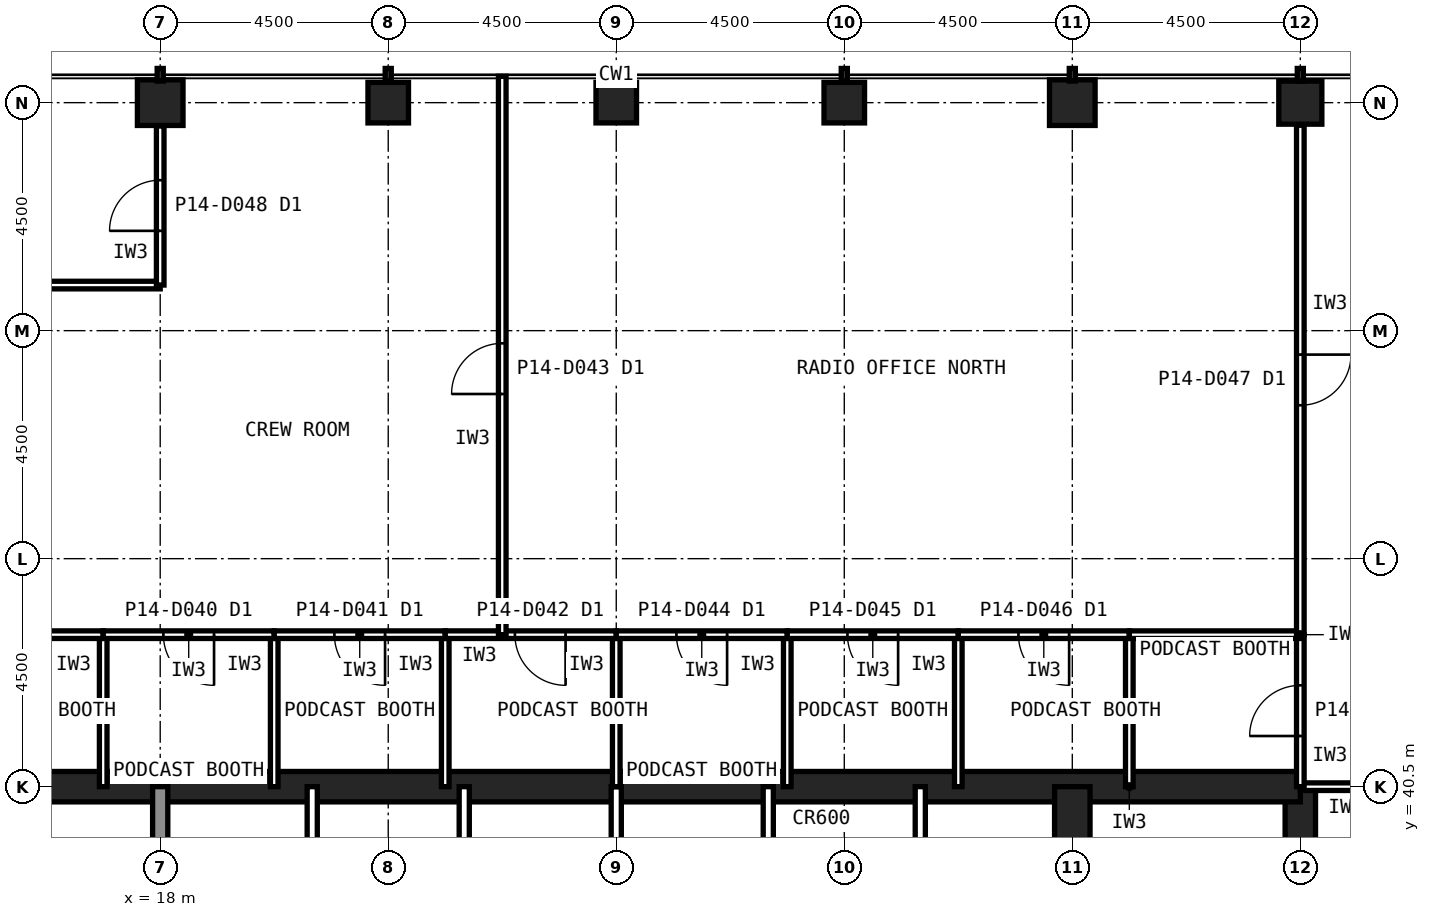
"""IFC4 building model, lengths in metres.
Left out: names, types, materials, properties, quantities, classifications, styles, units other than length and angle.
Written with IfcOpenShell. Run it as: python <this file> out.ifc"""

import sys

from ifc_helpers import new_model, si_unit, direction, frame, frame_2d, origin, origin_2d, place, context, subcontext, project, spatial, rectangle, hollow_rectangle, extrude, element, fill, save


model = new_model("IFC4")
c1 = context("Model", 3, precision=1e-05, world=origin(), true_north=direction((0.0, 1.0)))
c2 = subcontext(c1, "Body", "Model", "MODEL_VIEW")
j1 = project(units=[si_unit("LENGTHUNIT", "METRE"), si_unit("PLANEANGLEUNIT", "RADIAN")], contexts=[c1])
p1 = place(None, origin())
s1 = spatial("IfcSite", under=j1, at=p1, CompositionType="ELEMENT")
p2 = place(p1, origin())
s2 = spatial("IfcBuilding", under=s1, at=p2, CompositionType="ELEMENT")
p3 = place(p2, frame((0.0, 0.0, 62.6)))
s3 = spatial("IfcBuildingStorey", under=s2, at=p3, CompositionType="ELEMENT", Elevation=62.6)
p4 = place(p3, frame((40.5, 54.0, 0.0), z_axis=(0.0, 0.0, 1.0), x_axis=(1.0, 0.0, 0.0)))
e1 = element("IfcColumn", 1, at=p4, inside=s3, PredefinedType="COLUMN", context=c2, shape_type="SweptSolid", body=[
    extrude(hollow_rectangle(XDim=0.85, YDim=0.85, WallThickness=0.05, at=origin_2d()), origin(), (0.0, 0.0, 1.0), 4.2),
])
p5 = place(p3, frame((36.0, 54.0, 0.0), z_axis=(0.0, 0.0, 1.0), x_axis=(1.0, 0.0, 0.0)))
e2 = element("IfcColumn", 2, at=p5, inside=s3, PredefinedType="COLUMN", context=c2, shape_type="SweptSolid", body=[
    extrude(hollow_rectangle(XDim=0.9, YDim=0.9, WallThickness=0.063, at=origin_2d()), origin(), (0.0, 0.0, 1.0), 4.2),
])
for number, where, z_axis, x_axis in (
    (3, (31.5, 54.0, 0.0), (0.0, 0.0, 1.0), (1.0, 0.0, 0.0)),
    (4, (27.0, 54.0, 0.0), (0.0, 0.0, 1.0), (1.0, 0.0, 0.0)),
    (5, (22.5, 54.0, 0.0), (0.0, 0.0, 1.0), (1.0, 0.0, 0.0)),
):
    element("IfcColumn", number, at=place(p3, frame(where, z_axis=z_axis, x_axis=x_axis)), inside=s3, PredefinedType="COLUMN", context=c2, shape_type="SweptSolid", body=[
        extrude(hollow_rectangle(XDim=0.8, YDim=0.8, WallThickness=0.045, at=origin_2d()), origin(), (0.0, 0.0, 1.0), 4.2),
    ])
p6 = place(p3, frame((18.0, 54.0, 0.0), z_axis=(0.0, 0.0, 1.0), x_axis=(1.0, 0.0, 0.0)))
e6 = element("IfcColumn", 6, at=p6, inside=s3, PredefinedType="COLUMN", context=c2, shape_type="SweptSolid", body=[
    extrude(hollow_rectangle(XDim=0.9, YDim=0.9, WallThickness=0.063, at=origin_2d()), origin(), (0.0, 0.0, 1.0), 4.2),
])
p7 = place(p3, frame((40.5, 13.5, 0.0), z_axis=(0.0, 0.0, 1.0), x_axis=(0.0, 1.0, 0.0)))
e7 = element("IfcWall", 7, at=p7, inside=s3, PredefinedType="SHEAR", context=c2, shape_type="SweptSolid", body=[
    extrude(rectangle(XDim=27.0, YDim=0.6, at=frame_2d((13.5, 0.0))), origin(), (0.0, 0.0, 1.0), 4.2),
])
p8 = place(p7, frame((5.85, 0.0, 0.0)))
e8 = element("IfcOpeningElement", 8, at=p8, cuts=e7, PredefinedType="OPENING", context=c2, shape_type="SweptSolid", body=[
    extrude(rectangle(XDim=1.8, YDim=2.1, at=frame_2d((0.9, 1.05))), frame((0.0, 0.31, 0.0), z_axis=(0.0, -1.0, 0.0), x_axis=(1.0, 0.0, 0.0)), (0.0, 0.0, 1.0), 0.62),
])
p9 = place(p7, frame((19.65, 0.0, 0.0)))
e9 = element("IfcOpeningElement", 9, at=p9, cuts=e7, PredefinedType="OPENING", context=c2, shape_type="SweptSolid", body=[
    extrude(rectangle(XDim=1.2, YDim=2.1, at=frame_2d((0.6, 1.05))), frame((0.0, 0.31, 0.0), z_axis=(0.0, -1.0, 0.0), x_axis=(1.0, 0.0, 0.0)), (0.0, 0.0, 1.0), 0.62),
])
p10 = place(p3, frame((40.5, 40.5, 0.0), z_axis=(0.0, 0.0, 1.0), x_axis=(-1.0, 0.0, 0.0)))
e10 = element("IfcWall", 10, at=p10, inside=s3, PredefinedType="SHEAR", context=c2, shape_type="SweptSolid", body=[
    extrude(rectangle(XDim=27.0, YDim=0.6, at=frame_2d((13.5, 0.0))), origin(), (0.0, 0.0, 1.0), 4.2),
])
p11 = place(p3, frame((18.0, 36.0, 0.0), z_axis=(0.0, 0.0, 1.0), x_axis=(0.0, 1.0, 0.0)))
e11 = element("IfcWall", 11, at=p11, inside=s3, PredefinedType="SOLIDWALL", context=c2, shape_type="SweptSolid", body=[
    extrude(rectangle(XDim=4.5, YDim=0.3, at=frame_2d((2.25, 0.0))), origin(), (0.0, 0.0, 1.0), 4.04),
])
p12 = place(p3, frame((36.0, 22.5, 0.0), z_axis=(0.0, 0.0, 1.0), x_axis=(0.0, 1.0, 0.0)))
e12 = element("IfcWall", 12, at=p12, inside=s3, PredefinedType="SHEAR", context=c2, shape_type="SweptSolid", body=[
    extrude(rectangle(XDim=18.0, YDim=0.7, at=frame_2d((9.0, 0.0))), origin(), (0.0, 0.0, 1.0), 4.2),
])
for number, where, z_axis, x_axis in (
    (13, (21.0, 36.0, 0.0), (0.0, 0.0, 1.0), (0.0, 1.0, 0.0)),
    (14, (24.0, 36.0, 0.0), (0.0, 0.0, 1.0), (0.0, 1.0, 0.0)),
    (15, (27.0, 36.0, 0.0), (0.0, 0.0, 1.0), (0.0, 1.0, 0.0)),
    (16, (30.0, 36.0, 0.0), (0.0, 0.0, 1.0), (0.0, 1.0, 0.0)),
    (17, (33.0, 36.0, 0.0), (0.0, 0.0, 1.0), (0.0, 1.0, 0.0)),
):
    element("IfcWall", number, at=place(p3, frame(where, z_axis=z_axis, x_axis=x_axis)), inside=s3, PredefinedType="PARTITIONING", context=c2, shape_type="SweptSolid", body=[
        extrude(rectangle(XDim=4.5, YDim=0.2, at=frame_2d((2.25, 0.0))), origin(), (0.0, 0.0, 1.0), 4.04),
    ])
p13 = place(p3, frame((42.3, 40.5, 0.0), z_axis=(0.0, 0.0, 1.0), x_axis=(-1.0, 0.0, 0.0)))
e18 = element("IfcWall", 18, at=p13, inside=s3, PredefinedType="PARTITIONING", context=c2, shape_type="SweptSolid", body=[
    extrude(rectangle(XDim=1.8, YDim=0.15, at=frame_2d((0.9, 0.0))), origin(), (0.0, 0.0, 1.0), 3.189),
])
p14 = place(p3, frame((16.875, 40.5, 0.0), z_axis=(0.0, 0.0, 1.0), x_axis=(0.0, 1.0, 0.0)))
e19 = element("IfcWall", 19, at=p14, inside=s3, PredefinedType="PARTITIONING", context=c2, shape_type="SweptSolid", body=[
    extrude(rectangle(XDim=3.0, YDim=0.15, at=frame_2d((1.5, 0.0))), origin(), (0.0, 0.0, 1.0), 4.04),
])
p15 = place(p3, frame((16.875, 43.5, 0.0), z_axis=(0.0, 0.0, 1.0), x_axis=(-1.0, 0.0, 0.0)))
e20 = element("IfcWall", 20, at=p15, inside=s3, PredefinedType="PARTITIONING", context=c2, shape_type="SweptSolid", body=[
    extrude(rectangle(XDim=3.375, YDim=0.15, at=frame_2d((1.688, 0.0))), origin(), (0.0, 0.0, 1.0), 4.04),
])
p16 = place(p3, frame((20.25, 40.5, 0.0), z_axis=(0.0, 0.0, 1.0), x_axis=(0.0, 1.0, 0.0)))
e21 = element("IfcWall", 21, at=p16, inside=s3, PredefinedType="PARTITIONING", context=c2, shape_type="SweptSolid", body=[
    extrude(rectangle(XDim=3.0, YDim=0.15, at=frame_2d((1.5, 0.0))), origin(), (0.0, 0.0, 1.0), 4.04),
])
p17 = place(p3, frame((20.25, 43.5, 0.0), z_axis=(0.0, 0.0, 1.0), x_axis=(-1.0, 0.0, 0.0)))
e22 = element("IfcWall", 22, at=p17, inside=s3, PredefinedType="PARTITIONING", context=c2, shape_type="SweptSolid", body=[
    extrude(rectangle(XDim=3.375, YDim=0.15, at=frame_2d((1.688, 0.0))), origin(), (0.0, 0.0, 1.0), 4.04),
])
p18 = place(p17, frame((1.188, 0.0, 0.0)))
e23 = element("IfcOpeningElement", 23, at=p18, cuts=e22, PredefinedType="OPENING", context=c2, shape_type="SweptSolid", body=[
    extrude(rectangle(XDim=1.0, YDim=2.1, at=frame_2d((0.5, 1.05))), frame((0.0, 0.085, 0.0), z_axis=(0.0, -1.0, 0.0), x_axis=(1.0, 0.0, 0.0)), (0.0, 0.0, 1.0), 0.17),
])
p19 = place(p3, frame((23.625, 40.5, 0.0), z_axis=(0.0, 0.0, 1.0), x_axis=(0.0, 1.0, 0.0)))
e24 = element("IfcWall", 24, at=p19, inside=s3, PredefinedType="PARTITIONING", context=c2, shape_type="SweptSolid", body=[
    extrude(rectangle(XDim=3.0, YDim=0.15, at=frame_2d((1.5, 0.0))), origin(), (0.0, 0.0, 1.0), 4.04),
])
p20 = place(p3, frame((23.625, 43.5, 0.0), z_axis=(0.0, 0.0, 1.0), x_axis=(-1.0, 0.0, 0.0)))
e25 = element("IfcWall", 25, at=p20, inside=s3, PredefinedType="PARTITIONING", context=c2, shape_type="SweptSolid", body=[
    extrude(rectangle(XDim=3.375, YDim=0.15, at=frame_2d((1.688, 0.0))), origin(), (0.0, 0.0, 1.0), 4.04),
])
p21 = place(p20, frame((1.188, 0.0, 0.0)))
e26 = element("IfcOpeningElement", 26, at=p21, cuts=e25, PredefinedType="OPENING", context=c2, shape_type="SweptSolid", body=[
    extrude(rectangle(XDim=1.0, YDim=2.1, at=frame_2d((0.5, 1.05))), frame((0.0, 0.085, 0.0), z_axis=(0.0, -1.0, 0.0), x_axis=(1.0, 0.0, 0.0)), (0.0, 0.0, 1.0), 0.17),
])
p22 = place(p3, frame((27.0, 40.5, 0.0), z_axis=(0.0, 0.0, 1.0), x_axis=(0.0, 1.0, 0.0)))
e27 = element("IfcWall", 27, at=p22, inside=s3, PredefinedType="PARTITIONING", context=c2, shape_type="SweptSolid", body=[
    extrude(rectangle(XDim=3.0, YDim=0.15, at=frame_2d((1.5, 0.0))), origin(), (0.0, 0.0, 1.0), 3.189),
])
p23 = place(p3, frame((27.0, 43.5, 0.0), z_axis=(0.0, 0.0, 1.0), x_axis=(-1.0, 0.0, 0.0)))
e28 = element("IfcWall", 28, at=p23, inside=s3, PredefinedType="PARTITIONING", context=c2, shape_type="SweptSolid", body=[
    extrude(rectangle(XDim=3.375, YDim=0.15, at=frame_2d((1.688, 0.0))), origin(), (0.0, 0.0, 1.0), 4.04),
])
p24 = place(p23, frame((1.0, 0.0, 0.0)))
e29 = element("IfcOpeningElement", 29, at=p24, cuts=e28, PredefinedType="OPENING", context=c2, shape_type="SweptSolid", body=[
    extrude(rectangle(XDim=1.0, YDim=2.1, at=frame_2d((0.5, 1.05))), frame((0.0, 0.085, 0.0), z_axis=(0.0, -1.0, 0.0), x_axis=(1.0, 0.0, 0.0)), (0.0, 0.0, 1.0), 0.17),
])
p25 = place(p3, frame((30.375, 40.5, 0.0), z_axis=(0.0, 0.0, 1.0), x_axis=(0.0, 1.0, 0.0)))
e30 = element("IfcWall", 30, at=p25, inside=s3, PredefinedType="PARTITIONING", context=c2, shape_type="SweptSolid", body=[
    extrude(rectangle(XDim=3.0, YDim=0.15, at=frame_2d((1.5, 0.0))), origin(), (0.0, 0.0, 1.0), 4.04),
])
p26 = place(p3, frame((30.375, 43.5, 0.0), z_axis=(0.0, 0.0, 1.0), x_axis=(-1.0, 0.0, 0.0)))
e31 = element("IfcWall", 31, at=p26, inside=s3, PredefinedType="PARTITIONING", context=c2, shape_type="SweptSolid", body=[
    extrude(rectangle(XDim=3.375, YDim=0.15, at=frame_2d((1.688, 0.0))), origin(), (0.0, 0.0, 1.0), 4.04),
])
p27 = place(p26, frame((1.188, 0.0, 0.0)))
e32 = element("IfcOpeningElement", 32, at=p27, cuts=e31, PredefinedType="OPENING", context=c2, shape_type="SweptSolid", body=[
    extrude(rectangle(XDim=1.0, YDim=2.1, at=frame_2d((0.5, 1.05))), frame((0.0, 0.085, 0.0), z_axis=(0.0, -1.0, 0.0), x_axis=(1.0, 0.0, 0.0)), (0.0, 0.0, 1.0), 0.17),
])
p28 = place(p3, frame((33.75, 40.5, 0.0), z_axis=(0.0, 0.0, 1.0), x_axis=(0.0, 1.0, 0.0)))
e33 = element("IfcWall", 33, at=p28, inside=s3, PredefinedType="PARTITIONING", context=c2, shape_type="SweptSolid", body=[
    extrude(rectangle(XDim=3.0, YDim=0.15, at=frame_2d((1.5, 0.0))), origin(), (0.0, 0.0, 1.0), 4.04),
])
p29 = place(p3, frame((33.75, 43.5, 0.0), z_axis=(0.0, 0.0, 1.0), x_axis=(-1.0, 0.0, 0.0)))
e34 = element("IfcWall", 34, at=p29, inside=s3, PredefinedType="PARTITIONING", context=c2, shape_type="SweptSolid", body=[
    extrude(rectangle(XDim=3.375, YDim=0.15, at=frame_2d((1.688, 0.0))), origin(), (0.0, 0.0, 1.0), 4.04),
])
p30 = place(p29, frame((1.188, 0.0, 0.0)))
e35 = element("IfcOpeningElement", 35, at=p30, cuts=e34, PredefinedType="OPENING", context=c2, shape_type="SweptSolid", body=[
    extrude(rectangle(XDim=1.0, YDim=2.1, at=frame_2d((0.5, 1.05))), frame((0.0, 0.085, 0.0), z_axis=(0.0, -1.0, 0.0), x_axis=(1.0, 0.0, 0.0)), (0.0, 0.0, 1.0), 0.17),
])
p31 = place(p3, frame((37.125, 40.5, 0.0), z_axis=(0.0, 0.0, 1.0), x_axis=(0.0, 1.0, 0.0)))
e36 = element("IfcWall", 36, at=p31, inside=s3, PredefinedType="PARTITIONING", context=c2, shape_type="SweptSolid", body=[
    extrude(rectangle(XDim=3.0, YDim=0.15, at=frame_2d((1.5, 0.0))), origin(), (0.0, 0.0, 1.0), 4.04),
])
p32 = place(p3, frame((37.125, 43.5, 0.0), z_axis=(0.0, 0.0, 1.0), x_axis=(-1.0, 0.0, 0.0)))
e37 = element("IfcWall", 37, at=p32, inside=s3, PredefinedType="PARTITIONING", context=c2, shape_type="SweptSolid", body=[
    extrude(rectangle(XDim=3.375, YDim=0.15, at=frame_2d((1.688, 0.0))), origin(), (0.0, 0.0, 1.0), 4.04),
])
p33 = place(p32, frame((1.188, 0.0, 0.0)))
e38 = element("IfcOpeningElement", 38, at=p33, cuts=e37, PredefinedType="OPENING", context=c2, shape_type="SweptSolid", body=[
    extrude(rectangle(XDim=1.0, YDim=2.1, at=frame_2d((0.5, 1.05))), frame((0.0, 0.085, 0.0), z_axis=(0.0, -1.0, 0.0), x_axis=(1.0, 0.0, 0.0)), (0.0, 0.0, 1.0), 0.17),
])
p34 = place(p3, frame((40.5, 40.5, 0.0), z_axis=(0.0, 0.0, 1.0), x_axis=(0.0, 1.0, 0.0)))
e39 = element("IfcWall", 39, at=p34, inside=s3, PredefinedType="PARTITIONING", context=c2, shape_type="SweptSolid", body=[
    extrude(rectangle(XDim=3.0, YDim=0.15, at=frame_2d((1.5, 0.0))), origin(), (0.0, 0.0, 1.0), 3.189),
])
p35 = place(p34, frame((1.0, 0.0, 0.0)))
e40 = element("IfcOpeningElement", 40, at=p35, cuts=e39, PredefinedType="OPENING", context=c2, shape_type="SweptSolid", body=[
    extrude(rectangle(XDim=1.0, YDim=2.1, at=frame_2d((0.5, 1.05))), frame((0.0, 0.085, 0.0), z_axis=(0.0, -1.0, 0.0), x_axis=(1.0, 0.0, 0.0)), (0.0, 0.0, 1.0), 0.17),
])
p36 = place(p3, frame((40.5, 43.5, 0.0), z_axis=(0.0, 0.0, 1.0), x_axis=(-1.0, 0.0, 0.0)))
e41 = element("IfcWall", 41, at=p36, inside=s3, PredefinedType="PARTITIONING", context=c2, shape_type="SweptSolid", body=[
    extrude(rectangle(XDim=3.375, YDim=0.15, at=frame_2d((1.688, 0.0))), origin(), (0.0, 0.0, 1.0), 4.04),
])
p37 = place(p3, frame((9.0, 50.4, 0.0), z_axis=(0.0, 0.0, 1.0), x_axis=(1.0, 0.0, 0.0)))
e42 = element("IfcWall", 42, at=p37, inside=s3, PredefinedType="PARTITIONING", context=c2, shape_type="SweptSolid", body=[
    extrude(rectangle(XDim=9.0, YDim=0.15, at=frame_2d((4.5, 0.0))), origin(), (0.0, 0.0, 1.0), 4.04),
])
p38 = place(p3, frame((18.0, 50.4, 0.0), z_axis=(0.0, 0.0, 1.0), x_axis=(0.0, 1.0, 0.0)))
e43 = element("IfcWall", 43, at=p38, inside=s3, PredefinedType="PARTITIONING", context=c2, shape_type="SweptSolid", body=[
    extrude(rectangle(XDim=3.14, YDim=0.15, at=frame_2d((1.57, 0.0))), origin(), (0.0, 0.0, 1.0), 3.189),
])
p39 = place(p38, frame((1.07, 0.0, 0.0)))
e44 = element("IfcOpeningElement", 44, at=p39, cuts=e43, PredefinedType="OPENING", context=c2, shape_type="SweptSolid", body=[
    extrude(rectangle(XDim=1.0, YDim=2.1, at=frame_2d((0.5, 1.05))), frame((0.0, 0.085, 0.0), z_axis=(0.0, -1.0, 0.0), x_axis=(1.0, 0.0, 0.0)), (0.0, 0.0, 1.0), 0.17),
])
p40 = place(p3, frame((40.5, 53.555, 0.0), z_axis=(0.0, 0.0, 1.0), x_axis=(0.0, -1.0, 0.0)))
e45 = element("IfcWall", 45, at=p40, inside=s3, PredefinedType="PARTITIONING", context=c2, shape_type="SweptSolid", body=[
    extrude(rectangle(XDim=10.055, YDim=0.15, at=frame_2d((5.027, 0.0))), origin(), (0.0, 0.0, 1.0), 3.189),
])
p41 = place(p40, frame((4.528, 0.0, 0.0)))
e46 = element("IfcOpeningElement", 46, at=p41, cuts=e45, PredefinedType="OPENING", context=c2, shape_type="SweptSolid", body=[
    extrude(rectangle(XDim=1.0, YDim=2.1, at=frame_2d((0.5, 1.05))), frame((0.0, 0.085, 0.0), z_axis=(0.0, -1.0, 0.0), x_axis=(1.0, 0.0, 0.0)), (0.0, 0.0, 1.0), 0.17),
])
p42 = place(p3, frame((24.75, 43.5, 0.0), z_axis=(0.0, 0.0, 1.0), x_axis=(0.0, 1.0, 0.0)))
e47 = element("IfcWall", 47, at=p42, inside=s3, PredefinedType="PARTITIONING", context=c2, shape_type="SweptSolid", body=[
    extrude(rectangle(XDim=11.02, YDim=0.15, at=frame_2d((5.51, 0.0))), origin(), (0.0, 0.0, 1.0), 4.04),
])
p43 = place(p42, frame((4.75, 0.0, 0.0)))
e48 = element("IfcOpeningElement", 48, at=p43, cuts=e47, PredefinedType="OPENING", context=c2, shape_type="SweptSolid", body=[
    extrude(rectangle(XDim=1.0, YDim=2.1, at=frame_2d((0.5, 1.05))), frame((0.0, 0.085, 0.0), z_axis=(0.0, -1.0, 0.0), x_axis=(1.0, 0.0, 0.0)), (0.0, 0.0, 1.0), 0.17),
])
p44 = place(p18, origin())
e49 = element("IfcDoor", 49, at=p44, inside=s3, OperationType="SINGLE_SWING_LEFT", PredefinedType="DOOR", context=c2, shape_type="SweptSolid", body=[
    extrude(rectangle(XDim=1.0, YDim=2.1, at=frame_2d((0.5, 1.05))), frame((0.0, 0.025, 0.0), z_axis=(0.0, -1.0, 0.0), x_axis=(1.0, 0.0, 0.0)), (0.0, 0.0, 1.0), 0.05),
])
fill(e23, e49)
p45 = place(p21, origin())
e50 = element("IfcDoor", 50, at=p45, inside=s3, OperationType="SINGLE_SWING_LEFT", PredefinedType="DOOR", context=c2, shape_type="SweptSolid", body=[
    extrude(rectangle(XDim=1.0, YDim=2.1, at=frame_2d((0.5, 1.05))), frame((0.0, 0.025, 0.0), z_axis=(0.0, -1.0, 0.0), x_axis=(1.0, 0.0, 0.0)), (0.0, 0.0, 1.0), 0.05),
])
fill(e26, e50)
p46 = place(p24, origin())
e51 = element("IfcDoor", 51, at=p46, inside=s3, OperationType="SINGLE_SWING_LEFT", PredefinedType="DOOR", context=c2, shape_type="SweptSolid", body=[
    extrude(rectangle(XDim=1.0, YDim=2.1, at=frame_2d((0.5, 1.05))), frame((0.0, 0.025, 0.0), z_axis=(0.0, -1.0, 0.0), x_axis=(1.0, 0.0, 0.0)), (0.0, 0.0, 1.0), 0.05),
])
fill(e29, e51)
p47 = place(p27, origin())
e52 = element("IfcDoor", 52, at=p47, inside=s3, OperationType="SINGLE_SWING_LEFT", PredefinedType="DOOR", context=c2, shape_type="SweptSolid", body=[
    extrude(rectangle(XDim=1.0, YDim=2.1, at=frame_2d((0.5, 1.05))), frame((0.0, 0.025, 0.0), z_axis=(0.0, -1.0, 0.0), x_axis=(1.0, 0.0, 0.0)), (0.0, 0.0, 1.0), 0.05),
])
fill(e32, e52)
p48 = place(p30, origin())
e53 = element("IfcDoor", 53, at=p48, inside=s3, OperationType="SINGLE_SWING_LEFT", PredefinedType="DOOR", context=c2, shape_type="SweptSolid", body=[
    extrude(rectangle(XDim=1.0, YDim=2.1, at=frame_2d((0.5, 1.05))), frame((0.0, 0.025, 0.0), z_axis=(0.0, -1.0, 0.0), x_axis=(1.0, 0.0, 0.0)), (0.0, 0.0, 1.0), 0.05),
])
fill(e35, e53)
p49 = place(p33, origin())
e54 = element("IfcDoor", 54, at=p49, inside=s3, OperationType="SINGLE_SWING_LEFT", PredefinedType="DOOR", context=c2, shape_type="SweptSolid", body=[
    extrude(rectangle(XDim=1.0, YDim=2.1, at=frame_2d((0.5, 1.05))), frame((0.0, 0.025, 0.0), z_axis=(0.0, -1.0, 0.0), x_axis=(1.0, 0.0, 0.0)), (0.0, 0.0, 1.0), 0.05),
])
fill(e38, e54)
p50 = place(p35, origin())
e55 = element("IfcDoor", 55, at=p50, inside=s3, OperationType="SINGLE_SWING_LEFT", PredefinedType="DOOR", context=c2, shape_type="SweptSolid", body=[
    extrude(rectangle(XDim=1.0, YDim=2.1, at=frame_2d((0.5, 1.05))), frame((0.0, 0.025, 0.0), z_axis=(0.0, -1.0, 0.0), x_axis=(1.0, 0.0, 0.0)), (0.0, 0.0, 1.0), 0.05),
])
fill(e40, e55)
p51 = place(p39, origin())
e56 = element("IfcDoor", 56, at=p51, inside=s3, OperationType="SINGLE_SWING_LEFT", PredefinedType="DOOR", context=c2, shape_type="SweptSolid", body=[
    extrude(rectangle(XDim=1.0, YDim=2.1, at=frame_2d((0.5, 1.05))), frame((0.0, 0.025, 0.0), z_axis=(0.0, -1.0, 0.0), x_axis=(1.0, 0.0, 0.0)), (0.0, 0.0, 1.0), 0.05),
])
fill(e44, e56)
p52 = place(p41, origin())
e57 = element("IfcDoor", 57, at=p52, inside=s3, OperationType="SINGLE_SWING_LEFT", PredefinedType="DOOR", context=c2, shape_type="SweptSolid", body=[
    extrude(rectangle(XDim=1.0, YDim=2.1, at=frame_2d((0.5, 1.05))), frame((0.0, 0.025, 0.0), z_axis=(0.0, -1.0, 0.0), x_axis=(1.0, 0.0, 0.0)), (0.0, 0.0, 1.0), 0.05),
])
fill(e46, e57)
p53 = place(p43, origin())
e58 = element("IfcDoor", 58, at=p53, inside=s3, OperationType="SINGLE_SWING_LEFT", PredefinedType="DOOR", context=c2, shape_type="SweptSolid", body=[
    extrude(rectangle(XDim=1.0, YDim=2.1, at=frame_2d((0.5, 1.05))), frame((0.0, 0.025, 0.0), z_axis=(0.0, -1.0, 0.0), x_axis=(1.0, 0.0, 0.0)), (0.0, 0.0, 1.0), 0.05),
])
fill(e48, e58)
save(model, sys.argv[1])
